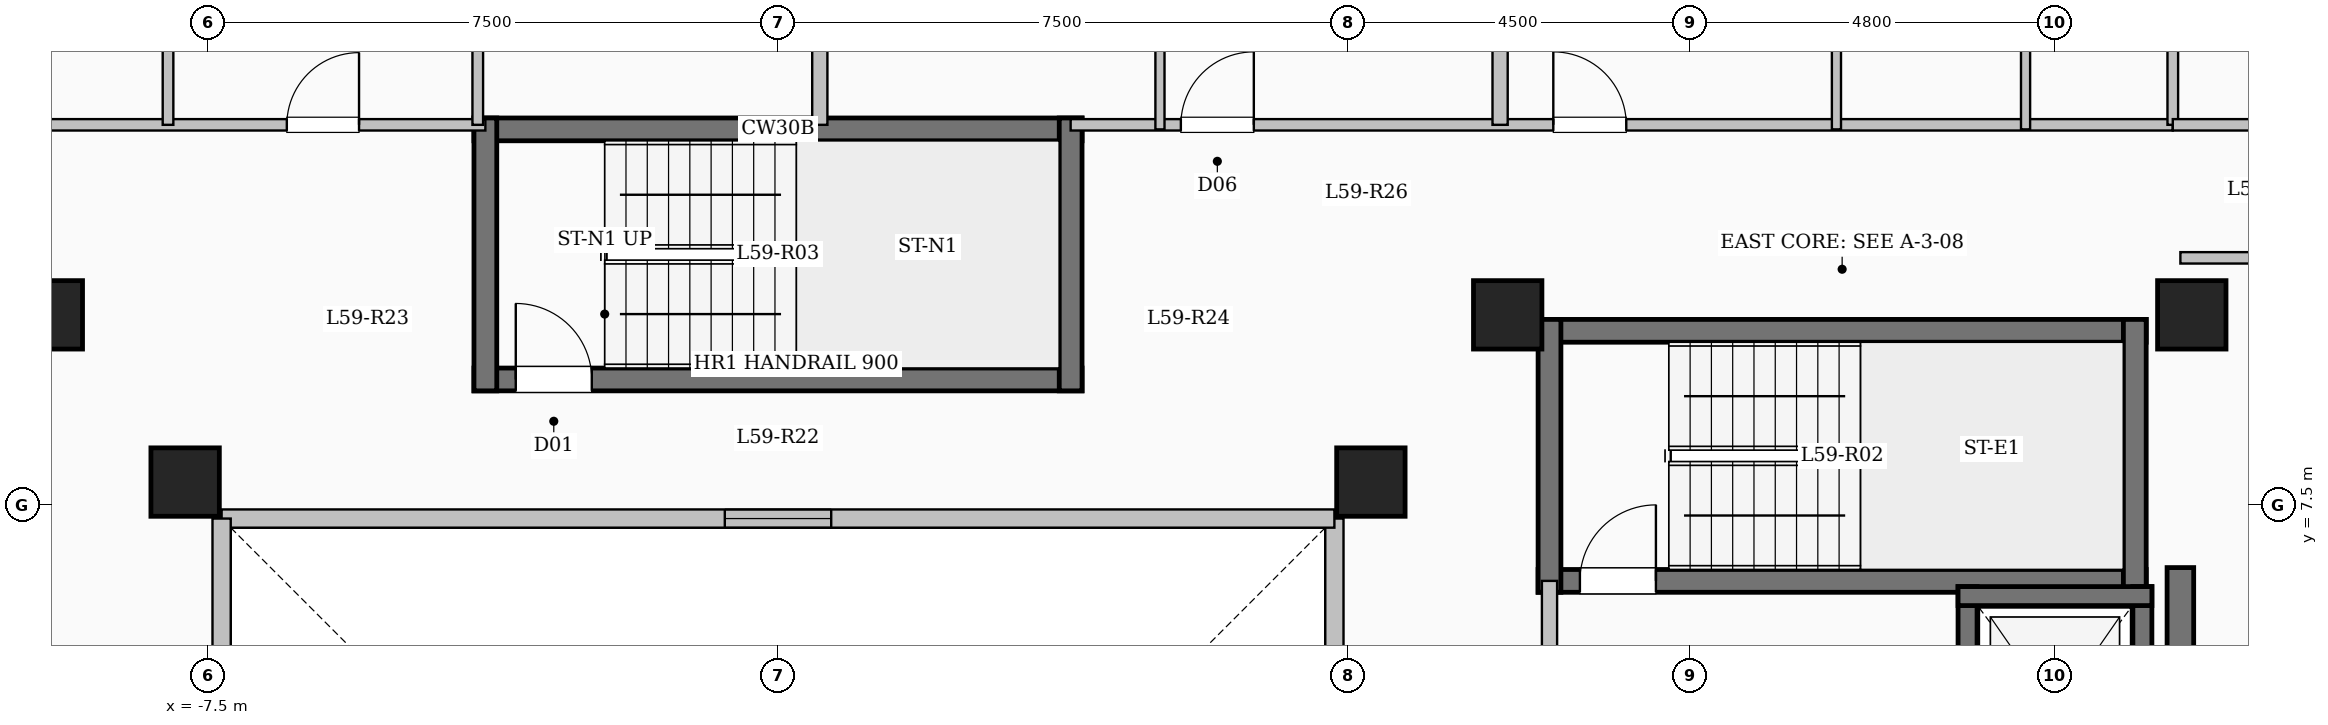
"""IFC4 building model, lengths in metres.
Left out: names, types, materials, properties, quantities, classifications, styles, units other than length and angle.
Written with IfcOpenShell. Run it as: python <this file> out.ifc"""

import sys

from ifc_helpers import new_model, si_unit, direction, frame, frame_2d, origin, origin_2d, place, context, subcontext, project, spatial, rectangle, extrude, element, fill, save


model = new_model("IFC4")
c1 = context("Model", 3, precision=1e-05, world=origin(), true_north=direction((0.0, 1.0)))
c2 = subcontext(c1, "Body", "Model", "MODEL_VIEW")
j1 = project(units=[si_unit("LENGTHUNIT", "METRE"), si_unit("PLANEANGLEUNIT", "RADIAN")], contexts=[c1])
p1 = place(None, origin())
s1 = spatial("IfcSite", under=j1, at=p1, CompositionType="ELEMENT")
p2 = place(p1, origin())
s2 = spatial("IfcBuilding", under=s1, at=p2, CompositionType="ELEMENT")
p3 = place(p2, frame((0.0, 0.0, 217.05)))
s3 = spatial("IfcBuildingStorey", under=s2, at=p3, CompositionType="ELEMENT", Elevation=217.05)
for number, where, z_axis, x_axis in (
    (1, (-7.8, 7.8, 0.0), (0.0, 0.0, 1.0), (1.0, 0.0, 0.0)),
    (2, (7.8, 7.8, 0.0), (0.0, 0.0, 1.0), (1.0, 0.0, 0.0)),
    (3, (-9.6, 10.0, 0.0), (0.0, 0.0, 1.0), (1.0, 0.0, 0.0)),
    (4, (9.6, 10.0, 0.0), (0.0, 0.0, 1.0), (1.0, 0.0, 0.0)),
    (5, (18.6, 10.0, 0.0), (0.0, 0.0, 1.0), (1.0, 0.0, 0.0)),
):
    element("IfcColumn", number, at=place(p3, frame(where, z_axis=z_axis, x_axis=x_axis)), inside=s3, PredefinedType="COLUMN", context=c2, shape_type="SweptSolid", body=[
        extrude(rectangle(XDim=0.9, YDim=0.9, at=origin_2d()), origin(), (0.0, 0.0, 1.0), 3.35),
    ])
p4 = place(p3, frame((7.32, -7.32, 0.0), z_axis=(0.0, 0.0, 1.0), x_axis=(0.0, 1.0, 0.0)))
e6 = element("IfcWall", 6, at=p4, inside=s3, PredefinedType="SOLIDWALL", context=c2, shape_type="SweptSolid", body=[
    extrude(rectangle(XDim=14.64, YDim=0.24, at=frame_2d((7.32, 0.0))), origin(), (0.0, 0.0, 1.0), 3.1),
])
p5 = place(p4, frame((6.62, 0.0, 0.95)))
e7 = element("IfcOpeningElement", 7, at=p5, cuts=e6, PredefinedType="OPENING", context=c2, shape_type="SweptSolid", body=[
    extrude(rectangle(XDim=1.4, YDim=1.5, at=frame_2d((0.7, 0.75))), frame((0.0, 0.13, 0.0), z_axis=(0.0, -1.0, 0.0), x_axis=(1.0, 0.0, 0.0)), (0.0, 0.0, 1.0), 0.26),
])
p6 = place(p3, frame((7.32, 7.32, 0.0), z_axis=(0.0, 0.0, 1.0), x_axis=(-1.0, 0.0, 0.0)))
e8 = element("IfcWall", 8, at=p6, inside=s3, PredefinedType="SOLIDWALL", context=c2, shape_type="SweptSolid", body=[
    extrude(rectangle(XDim=14.64, YDim=0.24, at=frame_2d((7.32, 0.0))), origin(), (0.0, 0.0, 1.0), 3.1),
])
p7 = place(p6, frame((6.62, 0.0, 0.95)))
e9 = element("IfcOpeningElement", 9, at=p7, cuts=e8, PredefinedType="OPENING", context=c2, shape_type="SweptSolid", body=[
    extrude(rectangle(XDim=1.4, YDim=1.5, at=frame_2d((0.7, 0.75))), frame((0.0, 0.13, 0.0), z_axis=(0.0, -1.0, 0.0), x_axis=(1.0, 0.0, 0.0)), (0.0, 0.0, 1.0), 0.26),
])
p8 = place(p3, frame((-7.32, 7.32, 0.0), z_axis=(0.0, 0.0, 1.0), x_axis=(0.0, -1.0, 0.0)))
e10 = element("IfcWall", 10, at=p8, inside=s3, PredefinedType="SOLIDWALL", context=c2, shape_type="SweptSolid", body=[
    extrude(rectangle(XDim=14.64, YDim=0.24, at=frame_2d((7.32, 0.0))), origin(), (0.0, 0.0, 1.0), 3.1),
])
p9 = place(p8, frame((6.62, 0.0, 0.95)))
e11 = element("IfcOpeningElement", 11, at=p9, cuts=e10, PredefinedType="OPENING", context=c2, shape_type="SweptSolid", body=[
    extrude(rectangle(XDim=1.4, YDim=1.5, at=frame_2d((0.7, 0.75))), frame((0.0, 0.13, 0.0), z_axis=(0.0, -1.0, 0.0), x_axis=(1.0, 0.0, 0.0)), (0.0, 0.0, 1.0), 0.26),
])
p10 = place(p3, frame((10.0, 9.79, 0.0), z_axis=(0.0, 0.0, 1.0), x_axis=(1.0, 0.0, 0.0)))
e12 = element("IfcWall", 12, at=p10, inside=s3, PredefinedType="SHEAR", context=c2, shape_type="SweptSolid", body=[
    extrude(rectangle(XDim=8.0, YDim=0.3, at=frame_2d((4.0, 0.0))), origin(), (0.0, 0.0, 1.0), 3.35),
])
p11 = place(p3, frame((10.0, 6.5, 0.0), z_axis=(0.0, 0.0, 1.0), x_axis=(1.0, 0.0, 0.0)))
e13 = element("IfcWall", 13, at=p11, inside=s3, PredefinedType="SHEAR", context=c2, shape_type="SweptSolid", body=[
    extrude(rectangle(XDim=8.0, YDim=0.3, at=frame_2d((4.0, 0.0))), origin(), (0.0, 0.0, 1.0), 3.35),
])
p12 = place(p11, frame((0.55, 0.0, 0.0)))
e14 = element("IfcOpeningElement", 14, at=p12, cuts=e13, PredefinedType="OPENING", context=c2, shape_type="SweptSolid", body=[
    extrude(rectangle(XDim=1.0, YDim=2.15, at=frame_2d((0.5, 1.075))), frame((0.0, 0.16, 0.0), z_axis=(0.0, -1.0, 0.0), x_axis=(1.0, 0.0, 0.0)), (0.0, 0.0, 1.0), 0.32),
])
for number, where, z_axis, x_axis in (
    (15, (10.15, 6.35, 0.0), (0.0, 0.0, 1.0), (0.0, 1.0, 0.0)),
    (16, (17.85, 6.35, 0.0), (0.0, 0.0, 1.0), (0.0, 1.0, 0.0)),
):
    element("IfcWall", number, at=place(p3, frame(where, z_axis=z_axis, x_axis=x_axis)), inside=s3, PredefinedType="SHEAR", context=c2, shape_type="SweptSolid", body=[
        extrude(rectangle(XDim=3.59, YDim=0.3, at=frame_2d((1.795, 0.0))), origin(), (0.0, 0.0, 1.0), 3.35),
    ])
p13 = place(p3, frame((-4.0, 12.44, 0.0), z_axis=(0.0, 0.0, 1.0), x_axis=(1.0, 0.0, 0.0)))
e17 = element("IfcWall", 17, at=p13, inside=s3, PredefinedType="SHEAR", context=c2, shape_type="SweptSolid", body=[
    extrude(rectangle(XDim=8.0, YDim=0.3, at=frame_2d((4.0, 0.0))), origin(), (0.0, 0.0, 1.0), 3.35),
])
p14 = place(p3, frame((-4.0, 9.15, 0.0), z_axis=(0.0, 0.0, 1.0), x_axis=(1.0, 0.0, 0.0)))
e18 = element("IfcWall", 18, at=p14, inside=s3, PredefinedType="SHEAR", context=c2, shape_type="SweptSolid", body=[
    extrude(rectangle(XDim=8.0, YDim=0.3, at=frame_2d((4.0, 0.0))), origin(), (0.0, 0.0, 1.0), 3.35),
])
p15 = place(p14, frame((0.55, 0.0, 0.0)))
e19 = element("IfcOpeningElement", 19, at=p15, cuts=e18, PredefinedType="OPENING", context=c2, shape_type="SweptSolid", body=[
    extrude(rectangle(XDim=1.0, YDim=2.15, at=frame_2d((0.5, 1.075))), frame((0.0, 0.16, 0.0), z_axis=(0.0, -1.0, 0.0), x_axis=(1.0, 0.0, 0.0)), (0.0, 0.0, 1.0), 0.32),
])
for number, where, z_axis, x_axis in (
    (20, (-3.85, 9.0, 0.0), (0.0, 0.0, 1.0), (0.0, 1.0, 0.0)),
    (21, (3.85, 9.0, 0.0), (0.0, 0.0, 1.0), (0.0, 1.0, 0.0)),
):
    element("IfcWall", number, at=place(p3, frame(where, z_axis=z_axis, x_axis=x_axis)), inside=s3, PredefinedType="SHEAR", context=c2, shape_type="SweptSolid", body=[
        extrude(rectangle(XDim=3.59, YDim=0.3, at=frame_2d((1.795, 0.0))), origin(), (0.0, 0.0, 1.0), 3.35),
    ])
p16 = place(p3, frame((10.15, 3.25, 0.0), z_axis=(0.0, 0.0, 1.0), x_axis=(0.0, 1.0, 0.0)))
e22 = element("IfcWall", 22, at=p16, inside=s3, PredefinedType="SOLIDWALL", context=c2, shape_type="SweptSolid", body=[
    extrude(rectangle(XDim=3.25, YDim=0.2, at=frame_2d((1.625, 0.0))), origin(), (0.0, 0.0, 1.0), 3.1),
])
p17 = place(p16, frame((1.1, 0.0, 0.0)))
e23 = element("IfcOpeningElement", 23, at=p17, cuts=e22, PredefinedType="OPENING", context=c2, shape_type="SweptSolid", body=[
    extrude(rectangle(XDim=1.02, YDim=2.15, at=frame_2d((0.51, 1.075))), frame((0.0, 0.11, 0.0), z_axis=(0.0, -1.0, 0.0), x_axis=(1.0, 0.0, 0.0)), (0.0, 0.0, 1.0), 0.22),
])
p18 = place(p3, frame((15.65, 3.175, 0.0), z_axis=(0.0, 0.0, 1.0), x_axis=(0.0, 1.0, 0.0)))
e24 = element("IfcWall", 24, at=p18, inside=s3, PredefinedType="SHEAR", context=c2, shape_type="SweptSolid", body=[
    extrude(rectangle(XDim=3.25, YDim=0.25, at=frame_2d((1.625, 0.0))), origin(), (0.0, 0.0, 1.0), 3.35),
])
p19 = place(p18, frame((1.075, 0.0, 0.0)))
e25 = element("IfcOpeningElement", 25, at=p19, cuts=e24, PredefinedType="OPENING", context=c2, shape_type="SweptSolid", body=[
    extrude(rectangle(XDim=1.1, YDim=2.15, at=frame_2d((0.55, 1.075))), frame((0.0, 0.135, 0.0), z_axis=(0.0, -1.0, 0.0), x_axis=(1.0, 0.0, 0.0)), (0.0, 0.0, 1.0), 0.27),
])
p20 = place(p3, frame((17.95, 3.175, 0.0), z_axis=(0.0, 0.0, 1.0), x_axis=(0.0, 1.0, 0.0)))
e26 = element("IfcWall", 26, at=p20, inside=s3, PredefinedType="SHEAR", context=c2, shape_type="SweptSolid", body=[
    extrude(rectangle(XDim=3.25, YDim=0.25, at=frame_2d((1.625, 0.0))), origin(), (0.0, 0.0, 1.0), 3.35),
])
p21 = place(p3, frame((15.525, 6.3, 0.0), z_axis=(0.0, 0.0, 1.0), x_axis=(1.0, 0.0, 0.0)))
e27 = element("IfcWall", 27, at=p21, inside=s3, PredefinedType="SHEAR", context=c2, shape_type="SweptSolid", body=[
    extrude(rectangle(XDim=2.55, YDim=0.25, at=frame_2d((1.275, 0.0))), origin(), (0.0, 0.0, 1.0), 3.35),
])
p22 = place(p3, frame((18.45, -7.375, 0.0), z_axis=(0.0, 0.0, 1.0), x_axis=(0.0, 1.0, 0.0)))
e28 = element("IfcWall", 28, at=p22, inside=s3, PredefinedType="SHEAR", context=c2, shape_type="SweptSolid", body=[
    extrude(rectangle(XDim=14.05, YDim=0.35, at=frame_2d((7.025, 0.0))), origin(), (0.0, 0.0, 1.0), 3.35),
])
p23 = place(p3, frame((-18.35, 12.5, 0.0), z_axis=(0.0, 0.0, 1.0), x_axis=(1.0, 0.0, 0.0)))
e29 = element("IfcWall", 29, at=p23, inside=s3, PredefinedType="PARTITIONING", context=c2, shape_type="SweptSolid", body=[
    extrude(rectangle(XDim=14.5, YDim=0.15, at=frame_2d((7.25, 0.0))), origin(), (0.0, 0.0, 1.0), 3.1),
])
p24 = place(p23, frame((2.076, 0.0, 0.0)))
e30 = element("IfcOpeningElement", 30, at=p24, cuts=e29, PredefinedType="OPENING", context=c2, shape_type="SweptSolid", body=[
    extrude(rectangle(XDim=0.95, YDim=2.15, at=frame_2d((0.475, 1.075))), frame((0.0, 0.085, 0.0), z_axis=(0.0, -1.0, 0.0), x_axis=(1.0, 0.0, 0.0)), (0.0, 0.0, 1.0), 0.17),
])
p25 = place(p23, frame((7.269, 0.0, 0.0)))
e31 = element("IfcOpeningElement", 31, at=p25, cuts=e29, PredefinedType="OPENING", context=c2, shape_type="SweptSolid", body=[
    extrude(rectangle(XDim=0.95, YDim=2.15, at=frame_2d((0.475, 1.075))), frame((0.0, 0.085, 0.0), z_axis=(0.0, -1.0, 0.0), x_axis=(1.0, 0.0, 0.0)), (0.0, 0.0, 1.0), 0.17),
])
p26 = place(p23, frame((11.888, 0.0, 0.0)))
e32 = element("IfcOpeningElement", 32, at=p26, cuts=e29, PredefinedType="OPENING", context=c2, shape_type="SweptSolid", body=[
    extrude(rectangle(XDim=0.95, YDim=2.15, at=frame_2d((0.475, 1.075))), frame((0.0, 0.085, 0.0), z_axis=(0.0, -1.0, 0.0), x_axis=(1.0, 0.0, 0.0)), (0.0, 0.0, 1.0), 0.17),
])
p27 = place(p3, frame((3.85, 12.5, 0.0), z_axis=(0.0, 0.0, 1.0), x_axis=(1.0, 0.0, 0.0)))
e33 = element("IfcWall", 33, at=p27, inside=s3, PredefinedType="PARTITIONING", context=c2, shape_type="SweptSolid", body=[
    extrude(rectangle(XDim=14.5, YDim=0.15, at=frame_2d((7.25, 0.0))), origin(), (0.0, 0.0, 1.0), 3.1),
])
p28 = place(p27, frame((1.45, 0.0, 0.0)))
e34 = element("IfcOpeningElement", 34, at=p28, cuts=e33, PredefinedType="OPENING", context=c2, shape_type="SweptSolid", body=[
    extrude(rectangle(XDim=0.96, YDim=2.15, at=frame_2d((0.48, 1.075))), frame((0.0, 0.085, 0.0), z_axis=(0.0, -1.0, 0.0), x_axis=(1.0, 0.0, 0.0)), (0.0, 0.0, 1.0), 0.17),
])
p29 = place(p27, frame((6.35, 0.0, 0.0)))
e35 = element("IfcOpeningElement", 35, at=p29, cuts=e33, PredefinedType="OPENING", context=c2, shape_type="SweptSolid", body=[
    extrude(rectangle(XDim=0.96, YDim=2.15, at=frame_2d((0.48, 1.075))), frame((0.0, 0.085, 0.0), z_axis=(0.0, -1.0, 0.0), x_axis=(1.0, 0.0, 0.0)), (0.0, 0.0, 1.0), 0.17),
])
p30 = place(p3, frame((0.55, 12.5, 0.0), z_axis=(0.0, 0.0, 1.0), x_axis=(0.0, 1.0, 0.0)))
e36 = element("IfcWall", 36, at=p30, inside=s3, PredefinedType="SOLIDWALL", context=c2, shape_type="SweptSolid", body=[
    extrude(rectangle(XDim=9.88, YDim=0.2, at=frame_2d((4.94, 0.0))), origin(), (0.0, 0.0, 1.0), 3.1),
])
p31 = place(p3, frame((-3.95, 12.5, 0.0), z_axis=(0.0, 0.0, 1.0), x_axis=(0.0, 1.0, 0.0)))
e37 = element("IfcWall", 37, at=p31, inside=s3, PredefinedType="PARTITIONING", context=c2, shape_type="SweptSolid", body=[
    extrude(rectangle(XDim=8.35, YDim=0.14, at=frame_2d((4.175, 0.0))), origin(), (0.0, 0.0, 1.0), 3.1),
])
p32 = place(p31, frame((1.2, 0.0, 0.0)))
e38 = element("IfcOpeningElement", 38, at=p32, cuts=e37, PredefinedType="OPENING", context=c2, shape_type="SweptSolid", body=[
    extrude(rectangle(XDim=0.95, YDim=2.15, at=frame_2d((0.475, 1.075))), frame((0.0, 0.08, 0.0), z_axis=(0.0, -1.0, 0.0), x_axis=(1.0, 0.0, 0.0)), (0.0, 0.0, 1.0), 0.16),
])
p33 = place(p3, frame((-8.025, 12.5, 0.0), z_axis=(0.0, 0.0, 1.0), x_axis=(0.0, 1.0, 0.0)))
e39 = element("IfcWall", 39, at=p33, inside=s3, PredefinedType="PARTITIONING", context=c2, shape_type="SweptSolid", body=[
    extrude(rectangle(XDim=8.35, YDim=0.14, at=frame_2d((4.175, 0.0))), origin(), (0.0, 0.0, 1.0), 2.585),
])
p34 = place(p3, frame((9.5, 12.5, 0.0), z_axis=(0.0, 0.0, 1.0), x_axis=(0.0, 1.0, 0.0)))
e40 = element("IfcWall", 40, at=p34, inside=s3, PredefinedType="SOLIDWALL", context=c2, shape_type="SweptSolid", body=[
    extrude(rectangle(XDim=8.77, YDim=0.2, at=frame_2d((4.385, 0.0))), origin(), (0.0, 0.0, 1.0), 3.1),
])
p35 = place(p3, frame((5.025, 12.44, 0.0), z_axis=(0.0, 0.0, 1.0), x_axis=(0.0, 1.0, 0.0)))
e41 = element("IfcWall", 41, at=p35, inside=s3, PredefinedType="PARTITIONING", context=c2, shape_type="SweptSolid", body=[
    extrude(rectangle(XDim=3.21, YDim=0.12, at=frame_2d((1.605, 0.0))), origin(), (0.0, 0.0, 1.0), 3.1),
])
p36 = place(p35, frame((1.195, 0.0, 0.0)))
e42 = element("IfcOpeningElement", 42, at=p36, cuts=e41, PredefinedType="OPENING", context=c2, shape_type="SweptSolid", body=[
    extrude(rectangle(XDim=0.88, YDim=2.1, at=frame_2d((0.44, 1.05))), frame((0.0, 0.07, 0.0), z_axis=(0.0, -1.0, 0.0), x_axis=(1.0, 0.0, 0.0)), (0.0, 0.0, 1.0), 0.14),
])
p37 = place(p3, frame((13.925, 12.44, 0.0), z_axis=(0.0, 0.0, 1.0), x_axis=(0.0, 1.0, 0.0)))
e43 = element("IfcWall", 43, at=p37, inside=s3, PredefinedType="PARTITIONING", context=c2, shape_type="SweptSolid", body=[
    extrude(rectangle(XDim=8.46, YDim=0.12, at=frame_2d((4.23, 0.0))), origin(), (0.0, 0.0, 1.0), 3.1),
])
p38 = place(p37, frame((3.075, 0.0, 0.0)))
e44 = element("IfcOpeningElement", 44, at=p38, cuts=e43, PredefinedType="OPENING", context=c2, shape_type="SweptSolid", body=[
    extrude(rectangle(XDim=1.08, YDim=2.15, at=frame_2d((0.54, 1.075))), frame((0.0, 0.07, 0.0), z_axis=(0.0, -1.0, 0.0), x_axis=(1.0, 0.0, 0.0)), (0.0, 0.0, 1.0), 0.14),
])
p39 = place(p3, frame((16.413, 12.44, 0.0), z_axis=(0.0, 0.0, 1.0), x_axis=(0.0, 1.0, 0.0)))
e45 = element("IfcWall", 45, at=p39, inside=s3, PredefinedType="PARTITIONING", context=c2, shape_type="SweptSolid", body=[
    extrude(rectangle(XDim=2.79, YDim=0.12, at=frame_2d((1.395, 0.0))), origin(), (0.0, 0.0, 1.0), 3.1),
])
p40 = place(p3, frame((18.45, 10.75, 0.0), z_axis=(0.0, 0.0, 1.0), x_axis=(1.0, 0.0, 0.0)))
e46 = element("IfcWall", 46, at=p40, inside=s3, PredefinedType="PARTITIONING", context=c2, shape_type="SweptSolid", body=[
    extrude(rectangle(XDim=5.13, YDim=0.15, at=frame_2d((2.565, 0.0))), origin(), (0.0, 0.0, 1.0), 3.1),
])
p41 = place(p3, frame((18.35, 12.5, 0.0), z_axis=(0.0, 0.0, 1.0), x_axis=(0.0, 1.0, 0.0)))
e47 = element("IfcWall", 47, at=p41, inside=s3, PredefinedType="PARTITIONING", context=c2, shape_type="SweptSolid", body=[
    extrude(rectangle(XDim=4.75, YDim=0.14, at=frame_2d((2.375, 0.0))), origin(), (0.0, 0.0, 1.0), 3.1),
])
p42 = place(p3, frame((18.35, 12.5, 0.0), z_axis=(0.0, 0.0, 1.0), x_axis=(1.0, 0.0, 0.0)))
e48 = element("IfcWall", 48, at=p42, inside=s3, PredefinedType="PARTITIONING", context=c2, shape_type="SweptSolid", body=[
    extrude(rectangle(XDim=5.23, YDim=0.15, at=frame_2d((2.615, 0.0))), origin(), (0.0, 0.0, 1.0), 3.1),
])
p43 = place(p42, frame((2.14, 0.0, 0.0)))
e49 = element("IfcOpeningElement", 49, at=p43, cuts=e48, PredefinedType="OPENING", context=c2, shape_type="SweptSolid", body=[
    extrude(rectangle(XDim=0.95, YDim=2.15, at=frame_2d((0.475, 1.075))), frame((0.0, 0.085, 0.0), z_axis=(0.0, -1.0, 0.0), x_axis=(1.0, 0.0, 0.0)), (0.0, 0.0, 1.0), 0.17),
])
p44 = place(p7, origin())
e50 = element("IfcWindow", 50, at=p44, inside=s3, PartitioningType="SINGLE_PANEL", PredefinedType="WINDOW", context=c2, shape_type="SweptSolid", body=[
    extrude(rectangle(XDim=1.4, YDim=1.5, at=frame_2d((0.7, 0.75))), frame((0.0, 0.03, 0.0), z_axis=(0.0, -1.0, 0.0), x_axis=(1.0, 0.0, 0.0)), (0.0, 0.0, 1.0), 0.06),
])
fill(e9, e50)
p45 = place(p12, origin())
e51 = element("IfcDoor", 51, at=p45, inside=s3, OperationType="SINGLE_SWING_RIGHT", PredefinedType="DOOR", context=c2, shape_type="SweptSolid", body=[
    extrude(rectangle(XDim=1.0, YDim=2.15, at=frame_2d((0.5, 1.075))), frame((0.0, 0.025, 0.0), z_axis=(0.0, -1.0, 0.0), x_axis=(1.0, 0.0, 0.0)), (0.0, 0.0, 1.0), 0.05),
])
fill(e14, e51)
p46 = place(p15, origin())
e52 = element("IfcDoor", 52, at=p46, inside=s3, OperationType="SINGLE_SWING_LEFT", PredefinedType="DOOR", context=c2, shape_type="SweptSolid", body=[
    extrude(rectangle(XDim=1.0, YDim=2.15, at=frame_2d((0.5, 1.075))), frame((0.0, 0.025, 0.0), z_axis=(0.0, -1.0, 0.0), x_axis=(1.0, 0.0, 0.0)), (0.0, 0.0, 1.0), 0.05),
])
fill(e19, e52)
p47 = place(p26, origin())
e53 = element("IfcDoor", 53, at=p47, inside=s3, OperationType="SINGLE_SWING_RIGHT", PredefinedType="DOOR", context=c2, shape_type="SweptSolid", body=[
    extrude(rectangle(XDim=0.95, YDim=2.15, at=frame_2d((0.475, 1.075))), frame((0.0, 0.025, 0.0), z_axis=(0.0, -1.0, 0.0), x_axis=(1.0, 0.0, 0.0)), (0.0, 0.0, 1.0), 0.05),
])
fill(e32, e53)
p48 = place(p28, origin())
e54 = element("IfcDoor", 54, at=p48, inside=s3, OperationType="SINGLE_SWING_RIGHT", PredefinedType="DOOR", context=c2, shape_type="SweptSolid", body=[
    extrude(rectangle(XDim=0.96, YDim=2.15, at=frame_2d((0.48, 1.075))), frame((0.0, 0.025, 0.0), z_axis=(0.0, -1.0, 0.0), x_axis=(1.0, 0.0, 0.0)), (0.0, 0.0, 1.0), 0.05),
])
fill(e34, e54)
p49 = place(p29, origin())
e55 = element("IfcDoor", 55, at=p49, inside=s3, OperationType="SINGLE_SWING_LEFT", PredefinedType="DOOR", context=c2, shape_type="SweptSolid", body=[
    extrude(rectangle(XDim=0.96, YDim=2.15, at=frame_2d((0.48, 1.075))), frame((0.0, 0.025, 0.0), z_axis=(0.0, -1.0, 0.0), x_axis=(1.0, 0.0, 0.0)), (0.0, 0.0, 1.0), 0.05),
])
fill(e35, e55)
save(model, sys.argv[1])
